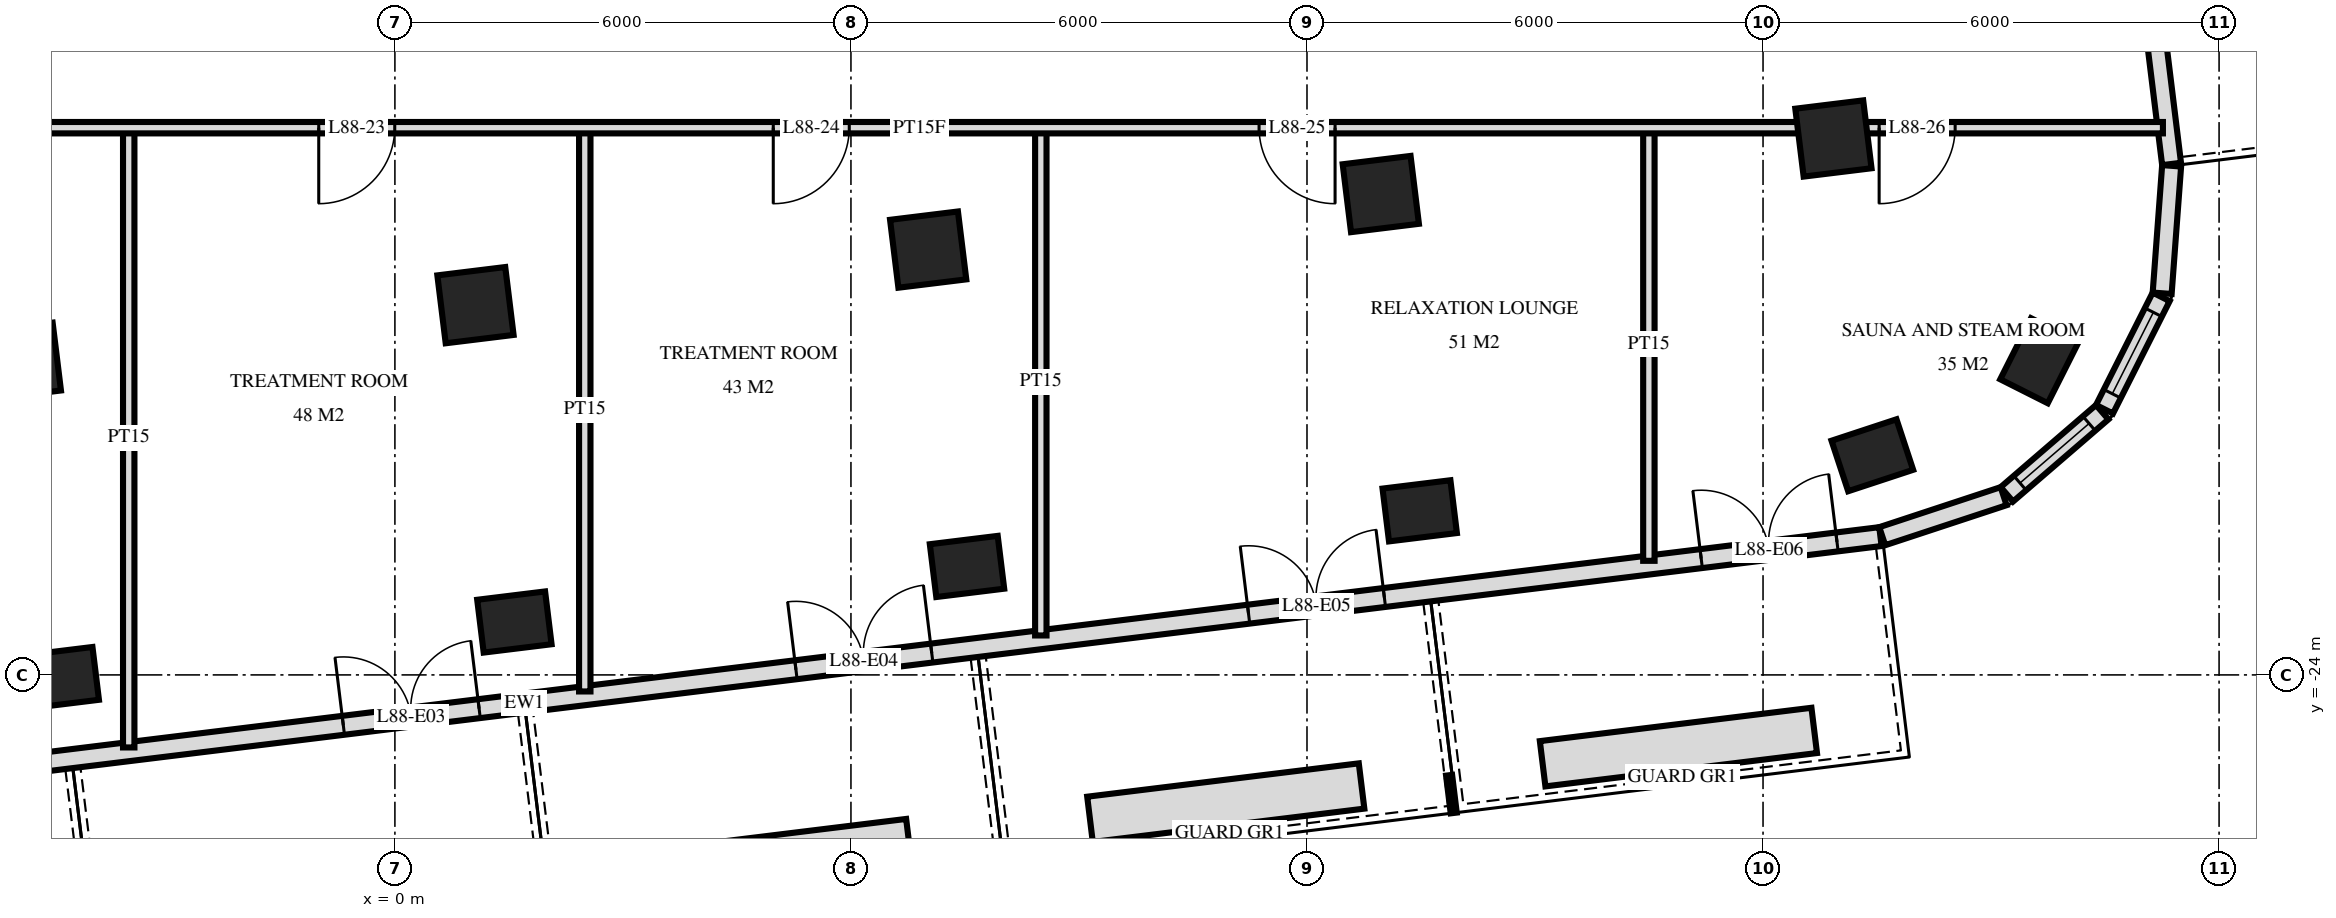
"""IFC4 building model, lengths in metres.
Left out: names, types, materials, properties, quantities, classifications, styles, units other than length and angle.
Written with IfcOpenShell. Run it as: python <this file> out.ifc"""

import sys

from ifc_helpers import new_model, si_unit, direction, frame, frame_2d, origin, origin_2d, place, context, subcontext, project, spatial, rectangle, extrude, element, fill, save


model = new_model("IFC4")
c1 = context("Model", 3, precision=1e-05, world=origin(), true_north=direction((0.0, 1.0)))
c2 = subcontext(c1, "Body", "Model", "MODEL_VIEW")
j1 = project(units=[si_unit("LENGTHUNIT", "METRE"), si_unit("PLANEANGLEUNIT", "RADIAN")], contexts=[c1])
p1 = place(None, origin())
s1 = spatial("IfcSite", under=j1, at=p1, CompositionType="ELEMENT")
p2 = place(p1, origin())
s2 = spatial("IfcBuilding", under=s1, at=p2, CompositionType="ELEMENT")
p3 = place(p2, frame((0.0, 0.0, 334.6)))
s3 = spatial("IfcBuildingStorey", under=s2, at=p3, CompositionType="ELEMENT", Elevation=334.6)
p4 = place(p3, frame((-4.895, -19.866, 0.0), z_axis=(0.0, 0.0, 1.0), x_axis=(0.992546151641, 0.121869343405, 0.0)))
e1 = element("IfcColumn", 1, at=p4, inside=s3, PredefinedType="COLUMN", context=c2, shape_type="SweptSolid", body=[
    extrude(rectangle(XDim=0.9, YDim=0.9, at=origin_2d()), origin(), (0.0, 0.0, 1.0), 4.0),
])
p5 = place(p3, frame((-4.383, -24.035, 0.0), z_axis=(0.0, 0.0, 1.0), x_axis=(0.992546151641, 0.121869343405, 0.0)))
e2 = element("IfcColumn", 2, at=p5, inside=s3, PredefinedType="COLUMN", context=c2, shape_type="SweptSolid", body=[
    extrude(rectangle(XDim=0.9, YDim=0.7, at=origin_2d()), origin(), (0.0, 0.0, 1.0), 4.0),
])
p6 = place(p3, frame((1.06, -19.135, 0.0), z_axis=(0.0, 0.0, 1.0), x_axis=(0.992546151641, 0.121869343405, 0.0)))
e3 = element("IfcColumn", 3, at=p6, inside=s3, PredefinedType="COLUMN", context=c2, shape_type="SweptSolid", body=[
    extrude(rectangle(XDim=0.9, YDim=0.9, at=origin_2d()), origin(), (0.0, 0.0, 1.0), 4.0),
])
p7 = place(p3, frame((1.572, -23.304, 0.0), z_axis=(0.0, 0.0, 1.0), x_axis=(0.992546151641, 0.121869343405, 0.0)))
e4 = element("IfcColumn", 4, at=p7, inside=s3, PredefinedType="COLUMN", context=c2, shape_type="SweptSolid", body=[
    extrude(rectangle(XDim=0.9, YDim=0.7, at=origin_2d()), origin(), (0.0, 0.0, 1.0), 4.0),
])
p8 = place(p3, frame((7.016, -18.404, 0.0), z_axis=(0.0, 0.0, 1.0), x_axis=(0.992546151641, 0.121869343405, 0.0)))
e5 = element("IfcColumn", 5, at=p8, inside=s3, PredefinedType="COLUMN", context=c2, shape_type="SweptSolid", body=[
    extrude(rectangle(XDim=0.9, YDim=0.9, at=origin_2d()), origin(), (0.0, 0.0, 1.0), 4.0),
])
p9 = place(p3, frame((7.527, -22.573, 0.0), z_axis=(0.0, 0.0, 1.0), x_axis=(0.992546151641, 0.121869343405, 0.0)))
e6 = element("IfcColumn", 6, at=p9, inside=s3, PredefinedType="COLUMN", context=c2, shape_type="SweptSolid", body=[
    extrude(rectangle(XDim=0.9, YDim=0.7, at=origin_2d()), origin(), (0.0, 0.0, 1.0), 4.0),
])
p10 = place(p3, frame((12.971, -17.673, 0.0), z_axis=(0.0, 0.0, 1.0), x_axis=(0.992546151641, 0.121869343405, 0.0)))
e7 = element("IfcColumn", 7, at=p10, inside=s3, PredefinedType="COLUMN", context=c2, shape_type="SweptSolid", body=[
    extrude(rectangle(XDim=0.9, YDim=0.9, at=origin_2d()), origin(), (0.0, 0.0, 1.0), 4.0),
])
p11 = place(p3, frame((13.483, -21.841, 0.0), z_axis=(0.0, 0.0, 1.0), x_axis=(0.992546151641, 0.121869343405, 0.0)))
e8 = element("IfcColumn", 8, at=p11, inside=s3, PredefinedType="COLUMN", context=c2, shape_type="SweptSolid", body=[
    extrude(rectangle(XDim=0.9, YDim=0.7, at=origin_2d()), origin(), (0.0, 0.0, 1.0), 4.0),
])
p12 = place(p3, frame((18.926, -16.942, 0.0), z_axis=(0.0, 0.0, 1.0), x_axis=(0.992546151641, 0.121869343405, 0.0)))
e9 = element("IfcColumn", 9, at=p12, inside=s3, PredefinedType="COLUMN", context=c2, shape_type="SweptSolid", body=[
    extrude(rectangle(XDim=0.9, YDim=0.9, at=origin_2d()), origin(), (0.0, 0.0, 1.0), 4.0),
])
for number, where, z_axis, x_axis in (
    (10, (19.438, -21.11, 0.0), (0.0, 0.0, 1.0), (0.95, 0.313, 0.0)),
    (11, (21.636, -19.866, 0.0), (0.0, 0.0, 1.0), (0.45, 0.893, 0.0)),
):
    element("IfcColumn", number, at=place(p3, frame(where, z_axis=z_axis, x_axis=x_axis)), inside=s3, PredefinedType="COLUMN", context=c2, shape_type="SweptSolid", body=[
        extrude(rectangle(XDim=0.9, YDim=0.7, at=origin_2d()), origin(), (0.0, 0.0, 1.0), 4.0),
    ])
p13 = place(p3, frame((-16.138, -26.561, 0.0), z_axis=(0.0, 0.0, 1.0), x_axis=(0.992546726876, 0.121864658405, 0.0)))
e12 = element("IfcWall", 12, at=p13, inside=s3, PredefinedType="SOLIDWALL", context=c2, shape_type="SweptSolid", body=[
    extrude(rectangle(XDim=35.951, YDim=0.25, at=frame_2d((17.975, 0.0))), origin(), (0.0, 0.0, 1.0), 3.72),
])
p14 = place(p13, frame((3.575, 0.0, 0.0)))
e13 = element("IfcOpeningElement", 13, at=p14, cuts=e12, PredefinedType="OPENING", context=c2, shape_type="SweptSolid", body=[
    extrude(rectangle(XDim=1.8, YDim=2.4, at=frame_2d((0.9, 1.2))), frame((0.0, 0.135, 0.0), z_axis=(0.0, -1.0, 0.0), x_axis=(1.0, 0.0, 0.0)), (0.0, 0.0, 1.0), 0.27),
])
p15 = place(p13, frame((9.575, 0.0, 0.0)))
e14 = element("IfcOpeningElement", 14, at=p15, cuts=e12, PredefinedType="OPENING", context=c2, shape_type="SweptSolid", body=[
    extrude(rectangle(XDim=1.8, YDim=2.4, at=frame_2d((0.9, 1.2))), frame((0.0, 0.135, 0.0), z_axis=(0.0, -1.0, 0.0), x_axis=(1.0, 0.0, 0.0)), (0.0, 0.0, 1.0), 0.27),
])
p16 = place(p13, frame((15.576, 0.0, 0.0)))
e15 = element("IfcOpeningElement", 15, at=p16, cuts=e12, PredefinedType="OPENING", context=c2, shape_type="SweptSolid", body=[
    extrude(rectangle(XDim=1.8, YDim=2.4, at=frame_2d((0.9, 1.2))), frame((0.0, 0.135, 0.0), z_axis=(0.0, -1.0, 0.0), x_axis=(1.0, 0.0, 0.0)), (0.0, 0.0, 1.0), 0.27),
])
p17 = place(p13, frame((21.575, 0.0, 0.0)))
e16 = element("IfcOpeningElement", 16, at=p17, cuts=e12, PredefinedType="OPENING", context=c2, shape_type="SweptSolid", body=[
    extrude(rectangle(XDim=1.8, YDim=2.4, at=frame_2d((0.9, 1.2))), frame((0.0, 0.135, 0.0), z_axis=(0.0, -1.0, 0.0), x_axis=(1.0, 0.0, 0.0)), (0.0, 0.0, 1.0), 0.27),
])
p18 = place(p13, frame((27.575, 0.0, 0.0)))
e17 = element("IfcOpeningElement", 17, at=p18, cuts=e12, PredefinedType="OPENING", context=c2, shape_type="SweptSolid", body=[
    extrude(rectangle(XDim=1.8, YDim=2.4, at=frame_2d((0.9, 1.2))), frame((0.0, 0.135, 0.0), z_axis=(0.0, -1.0, 0.0), x_axis=(1.0, 0.0, 0.0)), (0.0, 0.0, 1.0), 0.27),
])
p19 = place(p13, frame((33.575, 0.0, 0.0)))
e18 = element("IfcOpeningElement", 18, at=p19, cuts=e12, PredefinedType="OPENING", context=c2, shape_type="SweptSolid", body=[
    extrude(rectangle(XDim=1.8, YDim=2.4, at=frame_2d((0.9, 1.2))), frame((0.0, 0.135, 0.0), z_axis=(0.0, -1.0, 0.0), x_axis=(1.0, 0.0, 0.0)), (0.0, 0.0, 1.0), 0.27),
])
p20 = place(p3, frame((19.568, -22.175, 0.0), z_axis=(0.0, 0.0, 1.0), x_axis=(0.949694735798, 0.313177120489, 0.0)))
e19 = element("IfcWall", 19, at=p20, inside=s3, PredefinedType="SOLIDWALL", context=c2, shape_type="SweptSolid", body=[
    extrude(rectangle(XDim=1.681, YDim=0.25, at=frame_2d((0.841, 0.0))), origin(), (0.0, 0.0, 1.0), 3.72),
])
p21 = place(p3, frame((21.208, -21.624, 0.0), z_axis=(0.0, 0.0, 1.0), x_axis=(0.757568315466, 0.652755886531, 0.0)))
e20 = element("IfcWall", 20, at=p21, inside=s3, PredefinedType="SOLIDWALL", context=c2, shape_type="SweptSolid", body=[
    extrude(rectangle(XDim=1.656, YDim=0.25, at=frame_2d((0.828, 0.0))), origin(), (0.0, 0.0, 1.0), 3.72),
])
p22 = place(p21, frame((0.228, 0.0, 0.9)))
e21 = element("IfcOpeningElement", 21, at=p22, cuts=e20, PredefinedType="OPENING", context=c2, shape_type="SweptSolid", body=[
    extrude(rectangle(XDim=1.2, YDim=1.5, at=frame_2d((0.6, 0.75))), frame((0.0, 0.135, 0.0), z_axis=(0.0, -1.0, 0.0), x_axis=(1.0, 0.0, 0.0)), (0.0, 0.0, 1.0), 0.27),
])
p23 = place(p3, frame((22.493, -20.505, 0.0), z_axis=(0.0, 0.0, 1.0), x_axis=(0.449982385812, 0.893037430604, 0.0)))
e22 = element("IfcWall", 22, at=p23, inside=s3, PredefinedType="SOLIDWALL", context=c2, shape_type="SweptSolid", body=[
    extrude(rectangle(XDim=1.656, YDim=0.25, at=frame_2d((0.828, 0.0))), origin(), (0.0, 0.0, 1.0), 3.72),
])
p24 = place(p23, frame((0.228, 0.0, 0.9)))
e23 = element("IfcOpeningElement", 23, at=p24, cuts=e22, PredefinedType="OPENING", context=c2, shape_type="SweptSolid", body=[
    extrude(rectangle(XDim=1.2, YDim=1.5, at=frame_2d((0.6, 0.75))), frame((0.0, 0.135, 0.0), z_axis=(0.0, -1.0, 0.0), x_axis=(1.0, 0.0, 0.0)), (0.0, 0.0, 1.0), 0.27),
])
p25 = place(p3, frame((23.251, -18.979, 0.0), z_axis=(0.0, 0.0, 1.0), x_axis=(0.074053534713, 0.997254267475, 0.0)))
e24 = element("IfcWall", 24, at=p25, inside=s3, PredefinedType="SOLIDWALL", context=c2, shape_type="SweptSolid", body=[
    extrude(rectangle(XDim=1.681, YDim=0.25, at=frame_2d((0.841, 0.0))), origin(), (0.0, 0.0, 1.0), 3.72),
])
p26 = place(p3, frame((23.375, -17.277, 0.0), z_axis=(0.0, 0.0, 1.0), x_axis=(-0.121862878281, 0.992546945437, 0.0)))
e25 = element("IfcWall", 25, at=p26, inside=s3, PredefinedType="SOLIDWALL", context=c2, shape_type="SweptSolid", body=[
    extrude(rectangle(XDim=19.151, YDim=0.25, at=frame_2d((9.575, 0.0))), origin(), (0.0, 0.0, 1.0), 3.72),
])
p27 = place(p26, frame((2.479, 0.0, 0.0)))
e26 = element("IfcOpeningElement", 26, at=p27, cuts=e25, PredefinedType="OPENING", context=c2, shape_type="SweptSolid", body=[
    extrude(rectangle(XDim=1.8, YDim=2.4, at=frame_2d((0.9, 1.2))), frame((0.0, 0.135, 0.0), z_axis=(0.0, -1.0, 0.0), x_axis=(1.0, 0.0, 0.0)), (0.0, 0.0, 1.0), 0.27),
])
p28 = place(p26, frame((5.575, 0.0, 0.0)))
e27 = element("IfcOpeningElement", 27, at=p28, cuts=e25, PredefinedType="OPENING", context=c2, shape_type="SweptSolid", body=[
    extrude(rectangle(XDim=1.8, YDim=2.4, at=frame_2d((0.9, 1.2))), frame((0.0, 0.135, 0.0), z_axis=(0.0, -1.0, 0.0), x_axis=(1.0, 0.0, 0.0)), (0.0, 0.0, 1.0), 0.27),
])
p29 = place(p26, frame((9.275, 0.0, 0.0)))
e28 = element("IfcOpeningElement", 28, at=p29, cuts=e25, PredefinedType="OPENING", context=c2, shape_type="SweptSolid", body=[
    extrude(rectangle(XDim=2.4, YDim=2.4, at=frame_2d((1.2, 1.2))), frame((0.0, 0.135, 0.0), z_axis=(0.0, -1.0, 0.0), x_axis=(1.0, 0.0, 0.0)), (0.0, 0.0, 1.0), 0.27),
])
p30 = place(p26, frame((12.575, 0.0, 0.0)))
e29 = element("IfcOpeningElement", 29, at=p30, cuts=e25, PredefinedType="OPENING", context=c2, shape_type="SweptSolid", body=[
    extrude(rectangle(XDim=1.8, YDim=2.4, at=frame_2d((0.9, 1.2))), frame((0.0, 0.135, 0.0), z_axis=(0.0, -1.0, 0.0), x_axis=(1.0, 0.0, 0.0)), (0.0, 0.0, 1.0), 0.27),
])
p31 = place(p26, frame((15.276, 0.0, 0.0)))
e30 = element("IfcOpeningElement", 30, at=p31, cuts=e25, PredefinedType="OPENING", context=c2, shape_type="SweptSolid", body=[
    extrude(rectangle(XDim=2.4, YDim=2.4, at=frame_2d((1.2, 1.2))), frame((0.0, 0.135, 0.0), z_axis=(0.0, -1.0, 0.0), x_axis=(1.0, 0.0, 0.0)), (0.0, 0.0, 1.0), 0.27),
])
p32 = place(p3, frame((6.763, -26.193, 0.0), z_axis=(0.0, 0.0, 1.0), x_axis=(-0.992546765488, -0.121864343918, 0.0)))
e31 = element("IfcWall", 31, at=p32, inside=s3, PredefinedType="USERDEFINED", context=c2, shape_type="SweptSolid", body=[
    extrude(rectangle(XDim=3.6, YDim=0.6, at=frame_2d((1.8, 0.0))), origin(), (0.0, 0.0, 1.0), 0.65),
])
for number, where, z_axis, x_axis in (
    (32, (12.718, -25.462, 0.0), (0.0, 0.0, 1.0), (-0.993, -0.122, 0.0)),
    (33, (18.673, -24.73, 0.0), (0.0, 0.0, 1.0), (-0.993, -0.122, 0.0)),
):
    element("IfcWall", number, at=place(p3, frame(where, z_axis=z_axis, x_axis=x_axis)), inside=s3, PredefinedType="USERDEFINED", context=c2, shape_type="SweptSolid", body=[
        extrude(rectangle(XDim=3.6, YDim=0.6, at=frame_2d((1.8, 0.0))), origin(), (0.0, 0.0, 1.0), 0.65),
    ])
p33 = place(p3, frame((16.498, -22.499, 0.0), z_axis=(0.0, 0.0, 1.0), x_axis=(0.0, 1.0, 0.0)))
e34 = element("IfcWall", 34, at=p33, inside=s3, PredefinedType="PARTITIONING", context=c2, shape_type="SweptSolid", body=[
    extrude(rectangle(XDim=5.699, YDim=0.15, at=frame_2d((2.849, 0.0))), origin(), (0.0, 0.0, 1.0), 3.72),
])
p34 = place(p3, frame((8.498, -23.481, 0.0), z_axis=(0.0, 0.0, 1.0), x_axis=(0.0, 1.0, 0.0)))
e35 = element("IfcWall", 35, at=p34, inside=s3, PredefinedType="PARTITIONING", context=c2, shape_type="SweptSolid", body=[
    extrude(rectangle(XDim=6.681, YDim=0.15, at=frame_2d((3.341, 0.0))), origin(), (0.0, 0.0, 1.0), 3.72),
])
p35 = place(p3, frame((2.498, -24.218, 0.0), z_axis=(0.0, 0.0, 1.0), x_axis=(0.0, 1.0, 0.0)))
e36 = element("IfcWall", 36, at=p35, inside=s3, PredefinedType="PARTITIONING", context=c2, shape_type="SweptSolid", body=[
    extrude(rectangle(XDim=7.418, YDim=0.15, at=frame_2d((3.709, 0.0))), origin(), (0.0, 0.0, 1.0), 3.72),
])
p36 = place(p3, frame((-3.502, -24.955, 0.0), z_axis=(0.0, 0.0, 1.0), x_axis=(0.0, 1.0, 0.0)))
e37 = element("IfcWall", 37, at=p36, inside=s3, PredefinedType="PARTITIONING", context=c2, shape_type="SweptSolid", body=[
    extrude(rectangle(XDim=8.155, YDim=0.15, at=frame_2d((4.077, 0.0))), origin(), (0.0, 0.0, 1.0), 3.72),
])
p37 = place(p3, frame((-9.461, -16.8, 0.0), z_axis=(0.0, 0.0, 1.0), x_axis=(1.0, 0.0, 0.0)))
e38 = element("IfcWall", 38, at=p37, inside=s3, PredefinedType="PARTITIONING", context=c2, shape_type="SweptSolid", body=[
    extrude(rectangle(XDim=32.722, YDim=0.15, at=frame_2d((16.361, 0.0))), origin(), (0.0, 0.0, 1.0), 3.72),
])
p38 = place(p37, frame((2.489, 0.0, 0.0)))
e39 = element("IfcOpeningElement", 39, at=p38, cuts=e38, PredefinedType="OPENING", context=c2, shape_type="SweptSolid", body=[
    extrude(rectangle(XDim=1.0, YDim=2.1, at=frame_2d((0.5, 1.05))), frame((0.0, 0.085, 0.0), z_axis=(0.0, -1.0, 0.0), x_axis=(1.0, 0.0, 0.0)), (0.0, 0.0, 1.0), 0.17),
])
p39 = place(p37, frame((8.459, 0.0, 0.0)))
e40 = element("IfcOpeningElement", 40, at=p39, cuts=e38, PredefinedType="OPENING", context=c2, shape_type="SweptSolid", body=[
    extrude(rectangle(XDim=1.0, YDim=2.1, at=frame_2d((0.5, 1.05))), frame((0.0, 0.085, 0.0), z_axis=(0.0, -1.0, 0.0), x_axis=(1.0, 0.0, 0.0)), (0.0, 0.0, 1.0), 0.17),
])
p40 = place(p37, frame((14.439, 0.0, 0.0)))
e41 = element("IfcOpeningElement", 41, at=p40, cuts=e38, PredefinedType="OPENING", context=c2, shape_type="SweptSolid", body=[
    extrude(rectangle(XDim=1.0, YDim=2.1, at=frame_2d((0.5, 1.05))), frame((0.0, 0.085, 0.0), z_axis=(0.0, -1.0, 0.0), x_axis=(1.0, 0.0, 0.0)), (0.0, 0.0, 1.0), 0.17),
])
p41 = place(p37, frame((20.831, 0.0, 0.0)))
e42 = element("IfcOpeningElement", 42, at=p41, cuts=e38, PredefinedType="OPENING", context=c2, shape_type="SweptSolid", body=[
    extrude(rectangle(XDim=1.0, YDim=2.1, at=frame_2d((0.5, 1.05))), frame((0.0, 0.085, 0.0), z_axis=(0.0, -1.0, 0.0), x_axis=(1.0, 0.0, 0.0)), (0.0, 0.0, 1.0), 0.17),
])
p42 = place(p37, frame((28.989, 0.0, 0.0)))
e43 = element("IfcOpeningElement", 43, at=p42, cuts=e38, PredefinedType="OPENING", context=c2, shape_type="SweptSolid", body=[
    extrude(rectangle(XDim=1.0, YDim=2.1, at=frame_2d((0.5, 1.05))), frame((0.0, 0.085, 0.0), z_axis=(0.0, -1.0, 0.0), x_axis=(1.0, 0.0, 0.0)), (0.0, 0.0, 1.0), 0.17),
])
p43 = place(p22, origin())
e44 = element("IfcWindow", 44, at=p43, inside=s3, PartitioningType="SINGLE_PANEL", PredefinedType="WINDOW", context=c2, shape_type="SweptSolid", body=[
    extrude(rectangle(XDim=1.2, YDim=1.5, at=frame_2d((0.6, 0.75))), frame((0.0, 0.03, 0.0), z_axis=(0.0, -1.0, 0.0), x_axis=(1.0, 0.0, 0.0)), (0.0, 0.0, 1.0), 0.06),
])
fill(e21, e44)
p44 = place(p24, origin())
e45 = element("IfcWindow", 45, at=p44, inside=s3, PartitioningType="SINGLE_PANEL", PredefinedType="WINDOW", context=c2, shape_type="SweptSolid", body=[
    extrude(rectangle(XDim=1.2, YDim=1.5, at=frame_2d((0.6, 0.75))), frame((0.0, 0.03, 0.0), z_axis=(0.0, -1.0, 0.0), x_axis=(1.0, 0.0, 0.0)), (0.0, 0.0, 1.0), 0.06),
])
fill(e23, e45)
p45 = place(p16, origin())
e46 = element("IfcDoor", 46, at=p45, inside=s3, OperationType="DOUBLE_DOOR_SINGLE_SWING", PredefinedType="DOOR", context=c2, shape_type="SweptSolid", body=[
    extrude(rectangle(XDim=1.8, YDim=2.4, at=frame_2d((0.9, 1.2))), frame((0.0, 0.025, 0.0), z_axis=(0.0, -1.0, 0.0), x_axis=(1.0, 0.0, 0.0)), (0.0, 0.0, 1.0), 0.05),
])
fill(e15, e46)
p46 = place(p17, origin())
e47 = element("IfcDoor", 47, at=p46, inside=s3, OperationType="DOUBLE_DOOR_SINGLE_SWING", PredefinedType="DOOR", context=c2, shape_type="SweptSolid", body=[
    extrude(rectangle(XDim=1.8, YDim=2.4, at=frame_2d((0.9, 1.2))), frame((0.0, 0.025, 0.0), z_axis=(0.0, -1.0, 0.0), x_axis=(1.0, 0.0, 0.0)), (0.0, 0.0, 1.0), 0.05),
])
fill(e16, e47)
p47 = place(p18, origin())
e48 = element("IfcDoor", 48, at=p47, inside=s3, OperationType="DOUBLE_DOOR_SINGLE_SWING", PredefinedType="DOOR", context=c2, shape_type="SweptSolid", body=[
    extrude(rectangle(XDim=1.8, YDim=2.4, at=frame_2d((0.9, 1.2))), frame((0.0, 0.025, 0.0), z_axis=(0.0, -1.0, 0.0), x_axis=(1.0, 0.0, 0.0)), (0.0, 0.0, 1.0), 0.05),
])
fill(e17, e48)
p48 = place(p19, origin())
e49 = element("IfcDoor", 49, at=p48, inside=s3, OperationType="DOUBLE_DOOR_SINGLE_SWING", PredefinedType="DOOR", context=c2, shape_type="SweptSolid", body=[
    extrude(rectangle(XDim=1.8, YDim=2.4, at=frame_2d((0.9, 1.2))), frame((0.0, 0.025, 0.0), z_axis=(0.0, -1.0, 0.0), x_axis=(1.0, 0.0, 0.0)), (0.0, 0.0, 1.0), 0.05),
])
fill(e18, e49)
p49 = place(p39, frame((0.5, 0.0, 0.0), z_axis=(0.0, 0.0, 1.0), x_axis=(-1.0, 0.0, 0.0)))
e50 = element("IfcDoor", 50, at=p49, inside=s3, OperationType="SINGLE_SWING_LEFT", PredefinedType="DOOR", context=c2, shape_type="SweptSolid", body=[
    extrude(rectangle(XDim=1.0, YDim=2.1, at=frame_2d((0.0, 1.05))), frame((0.0, -0.025, 0.0), z_axis=(0.0, 1.0, 0.0), x_axis=(-1.0, 0.0, 0.0)), (0.0, 0.0, 1.0), 0.05),
])
fill(e40, e50)
p50 = place(p40, frame((0.5, 0.0, 0.0), z_axis=(0.0, 0.0, 1.0), x_axis=(-1.0, 0.0, 0.0)))
e51 = element("IfcDoor", 51, at=p50, inside=s3, OperationType="SINGLE_SWING_LEFT", PredefinedType="DOOR", context=c2, shape_type="SweptSolid", body=[
    extrude(rectangle(XDim=1.0, YDim=2.1, at=frame_2d((0.0, 1.05))), frame((0.0, -0.025, 0.0), z_axis=(0.0, 1.0, 0.0), x_axis=(-1.0, 0.0, 0.0)), (0.0, 0.0, 1.0), 0.05),
])
fill(e41, e51)
p51 = place(p41, frame((0.5, 0.0, 0.0), z_axis=(0.0, 0.0, 1.0), x_axis=(-1.0, 0.0, 0.0)))
e52 = element("IfcDoor", 52, at=p51, inside=s3, OperationType="SINGLE_SWING_RIGHT", PredefinedType="DOOR", context=c2, shape_type="SweptSolid", body=[
    extrude(rectangle(XDim=1.0, YDim=2.1, at=frame_2d((0.0, 1.05))), frame((0.0, -0.025, 0.0), z_axis=(0.0, 1.0, 0.0), x_axis=(-1.0, 0.0, 0.0)), (0.0, 0.0, 1.0), 0.05),
])
fill(e42, e52)
p52 = place(p42, frame((0.5, 0.0, 0.0), z_axis=(0.0, 0.0, 1.0), x_axis=(-1.0, 0.0, 0.0)))
e53 = element("IfcDoor", 53, at=p52, inside=s3, OperationType="SINGLE_SWING_LEFT", PredefinedType="DOOR", context=c2, shape_type="SweptSolid", body=[
    extrude(rectangle(XDim=1.0, YDim=2.1, at=frame_2d((0.0, 1.05))), frame((0.0, -0.025, 0.0), z_axis=(0.0, 1.0, 0.0), x_axis=(-1.0, 0.0, 0.0)), (0.0, 0.0, 1.0), 0.05),
])
fill(e43, e53)
save(model, sys.argv[1])
